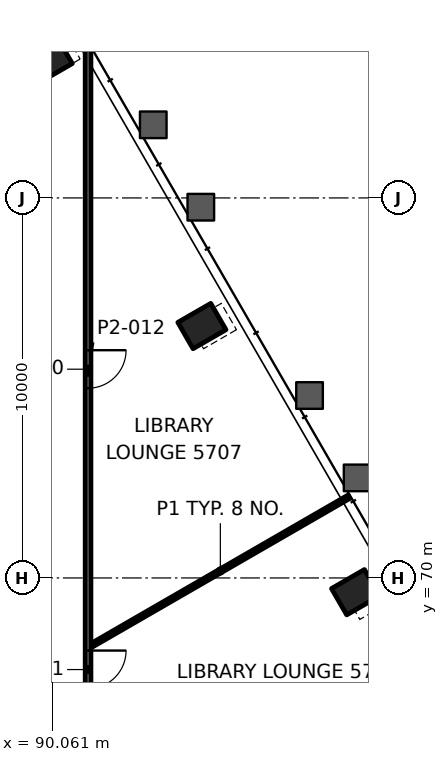
"""IFC4 building model, lengths in metres.
Left out: names, types, materials, properties, quantities, classifications, styles, units other than length and angle.
Written with IfcOpenShell. Run it as: python <this file> out.ifc"""

import sys

from ifc_helpers import new_model, si_unit, direction, frame, frame_2d, origin, origin_2d, place, context, subcontext, project, spatial, rectangle, hollow_rectangle, extrude, element, fill, save


model = new_model("IFC4")
c1 = context("Model", 3, precision=1e-05, world=origin(), true_north=direction((0.0, 1.0)))
c2 = subcontext(c1, "Body", "Model", "MODEL_VIEW")
j1 = project(units=[si_unit("LENGTHUNIT", "METRE"), si_unit("PLANEANGLEUNIT", "RADIAN")], contexts=[c1])
p1 = place(None, origin())
s1 = spatial("IfcSite", under=j1, at=p1, CompositionType="ELEMENT")
p2 = place(p1, origin())
s2 = spatial("IfcBuilding", under=s1, at=p2, CompositionType="ELEMENT")
p3 = place(p2, frame((0.0, 0.0, 241.6)))
s3 = spatial("IfcBuildingStorey", under=s2, at=p3, CompositionType="ELEMENT", Elevation=241.6)
for number, where, z_axis, x_axis in (
    (1, (98.039, 69.625, -0.0), (0.0, 0.0, 1.0), (-0.5, 0.866, 0.0)),
    (2, (93.996, 76.628, -0.0), (0.0, 0.0, 1.0), (-0.5, 0.866, 0.0)),
    (3, (89.952, 83.632, -0.0), (0.0, 0.0, 1.0), (-0.5, 0.866, 0.0)),
):
    element("IfcColumn", number, at=place(p3, frame(where, z_axis=z_axis, x_axis=x_axis)), inside=s3, PredefinedType="COLUMN", context=c2, shape_type="SweptSolid", body=[
        extrude(hollow_rectangle(XDim=0.8, YDim=1.0, WallThickness=0.05, at=origin_2d()), origin(), (0.0, 0.0, 1.0), 6.0),
    ])
p4 = place(p3, frame((91.101, 68.232, 0.0), z_axis=(0.0, 0.0, 1.0), x_axis=(0.866026716264, 0.499997726712, 0.0)))
e4 = element("IfcWall", 4, at=p4, inside=s3, PredefinedType="PARTITIONING", context=c2, shape_type="SweptSolid", body=[
    extrude(rectangle(XDim=7.805, YDim=0.1, at=frame_2d((3.903, 0.0))), origin(), (0.0, 0.0, 1.0), 4.872),
])
p5 = place(p3, frame((91.0, 84.017, 0.0), z_axis=(0.0, 0.0, 1.0), x_axis=(0.0, -1.0, 0.0)))
e5 = element("IfcWall", 5, at=p5, inside=s3, PredefinedType="PARTITIONING", context=c2, shape_type="SweptSolid", body=[
    extrude(rectangle(XDim=17.215, YDim=0.15, at=frame_2d((8.607, 0.0))), origin(), (0.0, 0.0, 1.0), 4.872),
])
p6 = place(p5, frame((8.024, 0.0, 0.0)))
e6 = element("IfcOpeningElement", 6, at=p6, cuts=e5, PredefinedType="OPENING", context=c2, shape_type="SweptSolid", body=[
    extrude(rectangle(XDim=1.0, YDim=2.1, at=frame_2d((0.5, 1.05))), frame((0.0, 0.085, 0.0), z_axis=(0.0, -1.0, 0.0), x_axis=(1.0, 0.0, 0.0)), (0.0, 0.0, 1.0), 0.17),
])
p7 = place(p5, frame((15.928, 0.0, 0.0)))
e7 = element("IfcOpeningElement", 7, at=p7, cuts=e5, PredefinedType="OPENING", context=c2, shape_type="SweptSolid", body=[
    extrude(rectangle(XDim=1.0, YDim=2.1, at=frame_2d((0.5, 1.05))), frame((0.0, 0.085, 0.0), z_axis=(0.0, -1.0, 0.0), x_axis=(1.0, 0.0, 0.0)), (0.0, 0.0, 1.0), 0.17),
])
p8 = place(p6, origin())
e8 = element("IfcDoor", 8, at=p8, inside=s3, OperationType="SINGLE_SWING_LEFT", PredefinedType="DOOR", context=c2, shape_type="SweptSolid", body=[
    extrude(rectangle(XDim=1.0, YDim=2.1, at=frame_2d((0.5, 1.05))), frame((0.0, 0.025, 0.0), z_axis=(0.0, -1.0, 0.0), x_axis=(1.0, 0.0, 0.0)), (0.0, 0.0, 1.0), 0.05),
])
fill(e6, e8)
p9 = place(p7, origin())
e9 = element("IfcDoor", 9, at=p9, inside=s3, OperationType="SINGLE_SWING_RIGHT", PredefinedType="DOOR", context=c2, shape_type="SweptSolid", body=[
    extrude(rectangle(XDim=1.0, YDim=2.1, at=frame_2d((0.5, 1.05))), frame((0.0, 0.025, 0.0), z_axis=(0.0, -1.0, 0.0), x_axis=(1.0, 0.0, 0.0)), (0.0, 0.0, 1.0), 0.05),
])
fill(e7, e9)
save(model, sys.argv[1])
